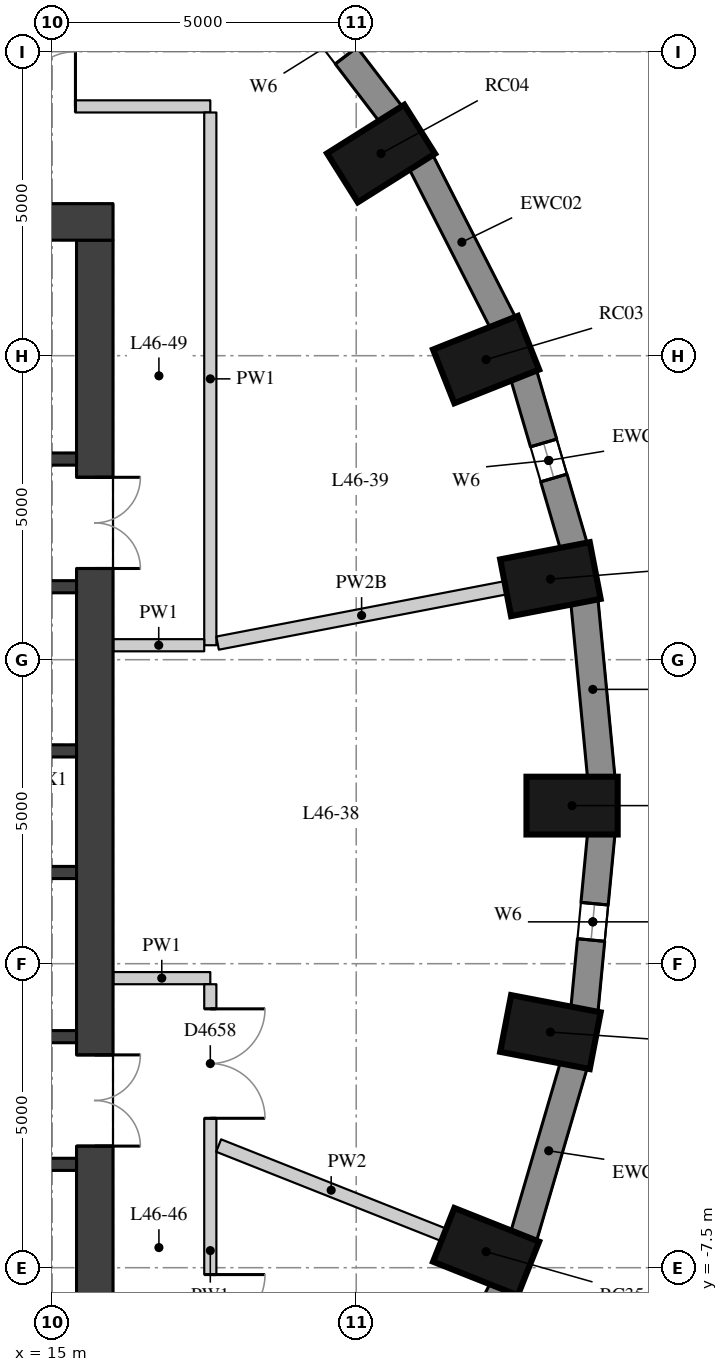
"""IFC4 building model, lengths in metres.
Left out: names, types, materials, properties, quantities, classifications, styles, units other than length and angle.
Written with IfcOpenShell. Run it as: python <this file> out.ifc"""

import sys

from ifc_helpers import new_model, si_unit, direction, frame, frame_2d, origin, origin_2d, place, context, subcontext, project, spatial, rectangle, extrude, element, fill, save


model = new_model("IFC4")
c1 = context("Model", 3, precision=1e-05, world=origin(), true_north=direction((0.0, 1.0)))
c2 = subcontext(c1, "Body", "Model", "MODEL_VIEW")
j1 = project(units=[si_unit("LENGTHUNIT", "METRE"), si_unit("PLANEANGLEUNIT", "RADIAN")], contexts=[c1])
p1 = place(None, origin())
s1 = spatial("IfcSite", under=j1, at=p1, CompositionType="ELEMENT")
p2 = place(p1, origin())
s2 = spatial("IfcBuilding", under=s1, at=p2, CompositionType="ELEMENT")
p3 = place(p2, frame((0.0, 0.0, 164.9)))
s3 = spatial("IfcBuildingStorey", under=s2, at=p3, CompositionType="ELEMENT", Elevation=164.9)
for number, where, z_axis, x_axis in (
    (1, (23.55, 0.1, 0.0), (0.0, 0.0, 1.0), (1.0, 0.0, 0.0)),
    (2, (23.194, 3.825, 0.0), (0.0, 0.0, 1.0), (0.982, 0.189, 0.0)),
    (3, (22.136, 7.436, 0.0), (0.0, 0.0, 1.0), (0.93, 0.369, 0.0)),
    (4, (20.408, 10.825, 0.0), (0.0, 0.0, 1.0), (0.846, 0.533, 0.0)),
    (5, (22.136, -7.236, 0.0), (0.0, 0.0, 1.0), (0.93, -0.369, 0.0)),
    (6, (23.194, -3.625, 0.0), (0.0, 0.0, 1.0), (0.982, -0.189, 0.0)),
):
    element("IfcColumn", number, at=place(p3, frame(where, z_axis=z_axis, x_axis=x_axis)), inside=s3, PredefinedType="COLUMN", context=c2, shape_type="SweptSolid", body=[
        extrude(rectangle(XDim=1.5, YDim=0.95, at=origin_2d()), origin(), (0.0, 0.0, 1.0), 3.3),
    ])
p4 = place(p3, frame((24.031, 0.555, 0.0), z_axis=(0.0, 0.0, 1.0), x_axis=(-0.095265737322, 0.995451876935, 0.0)))
e7 = element("IfcWall", 7, at=p4, inside=s3, PredefinedType="SOLIDWALL", context=c2, shape_type="SweptSolid", body=[
    extrude(rectangle(XDim=2.927, YDim=0.45, at=frame_2d((1.463, 0.0))), origin(), (0.0, 0.0, 1.0), 3.02),
])
p5 = place(p3, frame((23.58, 4.362, 0.0), z_axis=(0.0, 0.0, 1.0), x_axis=(-0.281049481624, 0.959693278542, 0.0)))
e8 = element("IfcWall", 8, at=p5, inside=s3, PredefinedType="SOLIDWALL", context=c2, shape_type="SweptSolid", body=[
    extrude(rectangle(XDim=2.948, YDim=0.45, at=frame_2d((1.474, 0.0))), origin(), (0.0, 0.0, 1.0), 3.02),
])
p6 = place(p5, frame((1.174, 0.0, 0.4)))
e9 = element("IfcOpeningElement", 9, at=p6, cuts=e8, PredefinedType="OPENING", context=c2, shape_type="SweptSolid", body=[
    extrude(rectangle(XDim=0.6, YDim=1.75, at=frame_2d((0.3, 0.875))), frame((0.0, 0.235, 0.0), z_axis=(0.0, -1.0, 0.0), x_axis=(1.0, 0.0, 0.0)), (0.0, 0.0, 1.0), 0.47),
])
p7 = place(p3, frame((22.415, 8.037, 0.0), z_axis=(0.0, 0.0, 1.0), x_axis=(-0.454133999889, 0.890933392653, 0.0)))
e10 = element("IfcWall", 10, at=p7, inside=s3, PredefinedType="SOLIDWALL", context=c2, shape_type="SweptSolid", body=[
    extrude(rectangle(XDim=2.986, YDim=0.45, at=frame_2d((1.493, 0.0))), origin(), (0.0, 0.0, 1.0), 3.02),
])
p8 = place(p3, frame((20.574, 11.467, 0.0), z_axis=(0.0, 0.0, 1.0), x_axis=(-0.607817056371, 0.794077090706, 0.0)))
e11 = element("IfcWall", 11, at=p8, inside=s3, PredefinedType="SOLIDWALL", context=c2, shape_type="SweptSolid", body=[
    extrude(rectangle(XDim=3.037, YDim=0.45, at=frame_2d((1.519, 0.0))), origin(), (0.0, 0.0, 1.0), 3.02),
])
p9 = place(p8, frame((1.219, 0.0, 0.4)))
e12 = element("IfcOpeningElement", 12, at=p9, cuts=e11, PredefinedType="OPENING", context=c2, shape_type="SweptSolid", body=[
    extrude(rectangle(XDim=0.6, YDim=1.75, at=frame_2d((0.3, 0.875))), frame((0.0, 0.235, 0.0), z_axis=(0.0, -1.0, 0.0), x_axis=(1.0, 0.0, 0.0)), (0.0, 0.0, 1.0), 0.47),
])
p10 = place(p3, frame((21.059, -10.497, 0.0), z_axis=(0.0, 0.0, 1.0), x_axis=(0.454133999889, 0.890933392653, 0.0)))
e13 = element("IfcWall", 13, at=p10, inside=s3, PredefinedType="SOLIDWALL", context=c2, shape_type="SweptSolid", body=[
    extrude(rectangle(XDim=2.986, YDim=0.45, at=frame_2d((1.493, 0.0))), origin(), (0.0, 0.0, 1.0), 3.02),
])
p11 = place(p10, frame((1.193, 0.0, 0.4)))
e14 = element("IfcOpeningElement", 14, at=p11, cuts=e13, PredefinedType="OPENING", context=c2, shape_type="SweptSolid", body=[
    extrude(rectangle(XDim=0.6, YDim=1.75, at=frame_2d((0.3, 0.875))), frame((0.0, 0.235, 0.0), z_axis=(0.0, -1.0, 0.0), x_axis=(1.0, 0.0, 0.0)), (0.0, 0.0, 1.0), 0.47),
])
p12 = place(p3, frame((22.751, -6.991, 0.0), z_axis=(0.0, 0.0, 1.0), x_axis=(0.281049481624, 0.959693278542, 0.0)))
e15 = element("IfcWall", 15, at=p12, inside=s3, PredefinedType="SOLIDWALL", context=c2, shape_type="SweptSolid", body=[
    extrude(rectangle(XDim=2.948, YDim=0.45, at=frame_2d((1.474, 0.0))), origin(), (0.0, 0.0, 1.0), 3.02),
])
p13 = place(p3, frame((23.752, -3.269, 0.0), z_axis=(0.0, 0.0, 1.0), x_axis=(0.095257827044, 0.995452633924, 0.0)))
e16 = element("IfcWall", 16, at=p13, inside=s3, PredefinedType="SOLIDWALL", context=c2, shape_type="SweptSolid", body=[
    extrude(rectangle(XDim=2.927, YDim=0.45, at=frame_2d((1.463, 0.0))), origin(), (0.0, 0.0, 1.0), 3.02),
])
p14 = place(p13, frame((1.163, 0.0, 0.4)))
e17 = element("IfcOpeningElement", 17, at=p14, cuts=e16, PredefinedType="OPENING", context=c2, shape_type="SweptSolid", body=[
    extrude(rectangle(XDim=0.6, YDim=1.75, at=frame_2d((0.3, 0.875))), frame((0.0, 0.235, 0.0), z_axis=(0.0, -1.0, 0.0), x_axis=(1.0, 0.0, 0.0)), (0.0, 0.0, 1.0), 0.47),
])
p15 = place(p3, frame((15.7, -9.4, 0.0), z_axis=(0.0, 0.0, 1.0), x_axis=(0.0, 1.0, 0.0)))
e18 = element("IfcWall", 18, at=p15, inside=s3, PredefinedType="SHEAR", context=c2, shape_type="SweptSolid", body=[
    extrude(rectangle(XDim=18.8, YDim=0.6, at=frame_2d((9.4, 0.0))), origin(), (0.0, 0.0, 1.0), 3.02),
])
p16 = place(p15, frame((13.4, 0.0, 0.0)))
e19 = element("IfcOpeningElement", 19, at=p16, cuts=e18, PredefinedType="OPENING", context=c2, shape_type="SweptSolid", body=[
    extrude(rectangle(XDim=1.5, YDim=2.1, at=frame_2d((0.75, 1.05))), frame((0.0, 0.31, 0.0), z_axis=(0.0, -1.0, 0.0), x_axis=(1.0, 0.0, 0.0)), (0.0, 0.0, 1.0), 0.62),
])
p17 = place(p15, frame((3.9, 0.0, 0.0)))
e20 = element("IfcOpeningElement", 20, at=p17, cuts=e18, PredefinedType="OPENING", context=c2, shape_type="SweptSolid", body=[
    extrude(rectangle(XDim=1.5, YDim=2.1, at=frame_2d((0.75, 1.05))), frame((0.0, 0.31, 0.0), z_axis=(0.0, -1.0, 0.0), x_axis=(1.0, 0.0, 0.0)), (0.0, 0.0, 1.0), 0.62),
])
p18 = place(p3, frame((4.0, 9.7, 0.0), z_axis=(0.0, 0.0, 1.0), x_axis=(1.0, 0.0, 0.0)))
e21 = element("IfcWall", 21, at=p18, inside=s3, PredefinedType="SHEAR", context=c2, shape_type="SweptSolid", body=[
    extrude(rectangle(XDim=12.0, YDim=0.6, at=frame_2d((6.0, 0.0))), origin(), (0.0, 0.0, 1.0), 3.02),
])
p19 = place(p3, frame((4.6, 5.8, 0.0), z_axis=(0.0, 0.0, 1.0), x_axis=(1.0, 0.0, 0.0)))
e22 = element("IfcWall", 22, at=p19, inside=s3, PredefinedType="SHEAR", context=c2, shape_type="SweptSolid", body=[
    extrude(rectangle(XDim=10.8, YDim=0.2, at=frame_2d((5.4, 0.0))), origin(), (0.0, 0.0, 1.0), 3.02),
])
p20 = place(p19, frame((7.05, 0.0, 0.0)))
e23 = element("IfcOpeningElement", 23, at=p20, cuts=e22, PredefinedType="OPENING", context=c2, shape_type="SweptSolid", body=[
    extrude(rectangle(XDim=1.1, YDim=2.1, at=frame_2d((0.55, 1.05))), frame((0.0, 0.11, 0.0), z_axis=(0.0, -1.0, 0.0), x_axis=(1.0, 0.0, 0.0)), (0.0, 0.0, 1.0), 0.22),
])
p21 = place(p19, frame((9.05, 0.0, 0.0)))
e24 = element("IfcOpeningElement", 24, at=p21, cuts=e22, PredefinedType="OPENING", context=c2, shape_type="SweptSolid", body=[
    extrude(rectangle(XDim=1.1, YDim=2.1, at=frame_2d((0.55, 1.05))), frame((0.0, 0.11, 0.0), z_axis=(0.0, -1.0, 0.0), x_axis=(1.0, 0.0, 0.0)), (0.0, 0.0, 1.0), 0.22),
])
p22 = place(p3, frame((4.6, 3.7, 0.0), z_axis=(0.0, 0.0, 1.0), x_axis=(1.0, 0.0, 0.0)))
e25 = element("IfcWall", 25, at=p22, inside=s3, PredefinedType="SHEAR", context=c2, shape_type="SweptSolid", body=[
    extrude(rectangle(XDim=10.8, YDim=0.2, at=frame_2d((5.4, 0.0))), origin(), (0.0, 0.0, 1.0), 3.02),
])
p23 = place(p22, frame((6.6, 0.0, 0.0)))
e26 = element("IfcOpeningElement", 26, at=p23, cuts=e25, PredefinedType="OPENING", context=c2, shape_type="SweptSolid", body=[
    extrude(rectangle(XDim=1.1, YDim=2.1, at=frame_2d((0.55, 1.05))), frame((0.0, 0.11, 0.0), z_axis=(0.0, -1.0, 0.0), x_axis=(1.0, 0.0, 0.0)), (0.0, 0.0, 1.0), 0.22),
])
p24 = place(p22, frame((8.9, 0.0, 0.0)))
e27 = element("IfcOpeningElement", 27, at=p24, cuts=e25, PredefinedType="OPENING", context=c2, shape_type="SweptSolid", body=[
    extrude(rectangle(XDim=1.1, YDim=2.1, at=frame_2d((0.55, 1.05))), frame((0.0, 0.11, 0.0), z_axis=(0.0, -1.0, 0.0), x_axis=(1.0, 0.0, 0.0)), (0.0, 0.0, 1.0), 0.22),
])
for number, where, z_axis, x_axis in (
    (28, (4.6, 1.0, 0.0), (0.0, 0.0, 1.0), (1.0, 0.0, 0.0)),
    (29, (4.6, -1.0, 0.0), (0.0, 0.0, 1.0), (1.0, 0.0, 0.0)),
):
    element("IfcWall", number, at=place(p3, frame(where, z_axis=z_axis, x_axis=x_axis)), inside=s3, PredefinedType="SHEAR", context=c2, shape_type="SweptSolid", body=[
        extrude(rectangle(XDim=10.8, YDim=0.2, at=frame_2d((5.4, 0.0))), origin(), (0.0, 0.0, 1.0), 3.02),
    ])
p25 = place(p3, frame((4.6, -3.7, 0.0), z_axis=(0.0, 0.0, 1.0), x_axis=(1.0, 0.0, 0.0)))
e30 = element("IfcWall", 30, at=p25, inside=s3, PredefinedType="SHEAR", context=c2, shape_type="SweptSolid", body=[
    extrude(rectangle(XDim=10.8, YDim=0.2, at=frame_2d((5.4, 0.0))), origin(), (0.0, 0.0, 1.0), 3.02),
])
p26 = place(p25, frame((6.6, 0.0, 0.0)))
e31 = element("IfcOpeningElement", 31, at=p26, cuts=e30, PredefinedType="OPENING", context=c2, shape_type="SweptSolid", body=[
    extrude(rectangle(XDim=1.1, YDim=2.1, at=frame_2d((0.55, 1.05))), frame((0.0, 0.11, 0.0), z_axis=(0.0, -1.0, 0.0), x_axis=(1.0, 0.0, 0.0)), (0.0, 0.0, 1.0), 0.22),
])
p27 = place(p25, frame((8.9, 0.0, 0.0)))
e32 = element("IfcOpeningElement", 32, at=p27, cuts=e30, PredefinedType="OPENING", context=c2, shape_type="SweptSolid", body=[
    extrude(rectangle(XDim=1.1, YDim=2.1, at=frame_2d((0.55, 1.05))), frame((0.0, 0.11, 0.0), z_axis=(0.0, -1.0, 0.0), x_axis=(1.0, 0.0, 0.0)), (0.0, 0.0, 1.0), 0.22),
])
p28 = place(p3, frame((4.6, -5.8, 0.0), z_axis=(0.0, 0.0, 1.0), x_axis=(1.0, 0.0, 0.0)))
e33 = element("IfcWall", 33, at=p28, inside=s3, PredefinedType="SHEAR", context=c2, shape_type="SweptSolid", body=[
    extrude(rectangle(XDim=10.8, YDim=0.2, at=frame_2d((5.4, 0.0))), origin(), (0.0, 0.0, 1.0), 3.02),
])
p29 = place(p3, frame((8.817, 11.6, 0.0), z_axis=(0.0, 0.0, 1.0), x_axis=(1.0, 0.0, 0.0)))
e34 = element("IfcWall", 34, at=p29, inside=s3, PredefinedType="PARTITIONING", context=c2, shape_type="SweptSolid", body=[
    extrude(rectangle(XDim=8.783, YDim=0.2, at=frame_2d((4.392, 0.0))), origin(), (0.0, 0.0, 1.0), 3.02),
])
p30 = place(p29, frame((0.14, 0.0, 0.0)))
e35 = element("IfcOpeningElement", 35, at=p30, cuts=e34, PredefinedType="OPENING", context=c2, shape_type="SweptSolid", body=[
    extrude(rectangle(XDim=1.1, YDim=2.1, at=frame_2d((0.55, 1.05))), frame((0.0, 0.11, 0.0), z_axis=(0.0, -1.0, 0.0), x_axis=(1.0, 0.0, 0.0)), (0.0, 0.0, 1.0), 0.22),
])
p31 = place(p29, frame((4.766, 0.0, 0.0)))
e36 = element("IfcOpeningElement", 36, at=p31, cuts=e34, PredefinedType="OPENING", context=c2, shape_type="SweptSolid", body=[
    extrude(rectangle(XDim=1.8, YDim=2.1, at=frame_2d((0.9, 1.05))), frame((0.0, 0.11, 0.0), z_axis=(0.0, -1.0, 0.0), x_axis=(1.0, 0.0, 0.0)), (0.0, 0.0, 1.0), 0.22),
])
p32 = place(p3, frame((17.6, 11.5, 0.0), z_axis=(0.0, 0.0, 1.0), x_axis=(0.0, -1.0, 0.0)))
e37 = element("IfcWall", 37, at=p32, inside=s3, PredefinedType="PARTITIONING", context=c2, shape_type="SweptSolid", body=[
    extrude(rectangle(XDim=8.762, YDim=0.2, at=frame_2d((4.381, 0.0))), origin(), (0.0, 0.0, 1.0), 3.02),
])
p33 = place(p3, frame((17.5, 2.738, 0.0), z_axis=(0.0, 0.0, 1.0), x_axis=(-1.0, 0.0, 0.0)))
e38 = element("IfcWall", 38, at=p33, inside=s3, PredefinedType="PARTITIONING", context=c2, shape_type="SweptSolid", body=[
    extrude(rectangle(XDim=1.496, YDim=0.2, at=frame_2d((0.748, 0.0))), origin(), (0.0, 0.0, 1.0), 3.02),
])
p34 = place(p3, frame((16.004, -2.738, 0.0), z_axis=(0.0, 0.0, 1.0), x_axis=(1.0, 0.0, 0.0)))
e39 = element("IfcWall", 39, at=p34, inside=s3, PredefinedType="PARTITIONING", context=c2, shape_type="SweptSolid", body=[
    extrude(rectangle(XDim=1.596, YDim=0.2, at=frame_2d((0.798, 0.0))), origin(), (0.0, 0.0, 1.0), 3.02),
])
p35 = place(p3, frame((17.6, -2.838, 0.0), z_axis=(0.0, 0.0, 1.0), x_axis=(0.0, -1.0, 0.0)))
e40 = element("IfcWall", 40, at=p35, inside=s3, PredefinedType="PARTITIONING", context=c2, shape_type="SweptSolid", body=[
    extrude(rectangle(XDim=8.762, YDim=0.2, at=frame_2d((4.381, 0.0))), origin(), (0.0, 0.0, 1.0), 3.02),
])
p36 = place(p35, frame((4.775, 0.0, 0.0)))
e41 = element("IfcOpeningElement", 41, at=p36, cuts=e40, PredefinedType="OPENING", context=c2, shape_type="SweptSolid", body=[
    extrude(rectangle(XDim=1.8, YDim=2.1, at=frame_2d((0.9, 1.05))), frame((0.0, 0.11, 0.0), z_axis=(0.0, -1.0, 0.0), x_axis=(1.0, 0.0, 0.0)), (0.0, 0.0, 1.0), 0.22),
])
p37 = place(p35, frame((0.405, 0.0, 0.0)))
e42 = element("IfcOpeningElement", 42, at=p37, cuts=e40, PredefinedType="OPENING", context=c2, shape_type="SweptSolid", body=[
    extrude(rectangle(XDim=1.8, YDim=2.1, at=frame_2d((0.9, 1.05))), frame((0.0, 0.11, 0.0), z_axis=(0.0, -1.0, 0.0), x_axis=(1.0, 0.0, 0.0)), (0.0, 0.0, 1.0), 0.22),
])
p38 = place(p3, frame((22.457, 3.683, 0.0), z_axis=(0.0, 0.0, 1.0), x_axis=(-0.982022686577, -0.188762928159, 0.0)))
e43 = element("IfcWall", 43, at=p38, inside=s3, PredefinedType="PARTITIONING", context=c2, shape_type="SweptSolid", body=[
    extrude(rectangle(XDim=4.824, YDim=0.22, at=frame_2d((2.412, 0.0))), origin(), (0.0, 0.0, 1.0), 2.57),
])
p39 = place(p3, frame((21.439, -6.96, 0.0), z_axis=(0.0, 0.0, 1.0), x_axis=(-0.929517399972, 0.368778257426, 0.0)))
e44 = element("IfcWall", 44, at=p39, inside=s3, PredefinedType="PARTITIONING", context=c2, shape_type="SweptSolid", body=[
    extrude(rectangle(XDim=3.982, YDim=0.22, at=frame_2d((1.991, 0.0))), origin(), (0.0, 0.0, 1.0), 3.02),
])
p40 = place(p6, origin())
e45 = element("IfcWindow", 45, at=p40, inside=s3, PartitioningType="SINGLE_PANEL", PredefinedType="WINDOW", context=c2, shape_type="SweptSolid", body=[
    extrude(rectangle(XDim=0.6, YDim=1.75, at=frame_2d((0.3, 0.875))), frame((0.0, 0.035, 0.0), z_axis=(0.0, -1.0, 0.0), x_axis=(1.0, 0.0, 0.0)), (0.0, 0.0, 1.0), 0.06),
])
fill(e9, e45)
p41 = place(p9, origin())
e46 = element("IfcWindow", 46, at=p41, inside=s3, PartitioningType="SINGLE_PANEL", PredefinedType="WINDOW", context=c2, shape_type="SweptSolid", body=[
    extrude(rectangle(XDim=0.6, YDim=1.75, at=frame_2d((0.3, 0.875))), frame((0.0, 0.035, 0.0), z_axis=(0.0, -1.0, 0.0), x_axis=(1.0, 0.0, 0.0)), (0.0, 0.0, 1.0), 0.06),
])
fill(e12, e46)
p42 = place(p14, origin())
e47 = element("IfcWindow", 47, at=p42, inside=s3, PartitioningType="SINGLE_PANEL", PredefinedType="WINDOW", context=c2, shape_type="SweptSolid", body=[
    extrude(rectangle(XDim=0.6, YDim=1.75, at=frame_2d((0.3, 0.875))), frame((0.0, 0.035, 0.0), z_axis=(0.0, -1.0, 0.0), x_axis=(1.0, 0.0, 0.0)), (0.0, 0.0, 1.0), 0.06),
])
fill(e17, e47)
p43 = place(p16, origin())
e48 = element("IfcDoor", 48, at=p43, inside=s3, OperationType="DOUBLE_DOOR_SINGLE_SWING", PredefinedType="DOOR", context=c2, shape_type="SweptSolid", body=[
    extrude(rectangle(XDim=1.5, YDim=2.1, at=frame_2d((0.75, 1.05))), frame((0.0, 0.025, 0.0), z_axis=(0.0, -1.0, 0.0), x_axis=(1.0, 0.0, 0.0)), (0.0, 0.0, 1.0), 0.05),
])
fill(e19, e48)
p44 = place(p17, origin())
e49 = element("IfcDoor", 49, at=p44, inside=s3, OperationType="DOUBLE_DOOR_SINGLE_SWING", PredefinedType="DOOR", context=c2, shape_type="SweptSolid", body=[
    extrude(rectangle(XDim=1.5, YDim=2.1, at=frame_2d((0.75, 1.05))), frame((0.0, 0.025, 0.0), z_axis=(0.0, -1.0, 0.0), x_axis=(1.0, 0.0, 0.0)), (0.0, 0.0, 1.0), 0.05),
])
fill(e20, e49)
p45 = place(p36, origin())
e50 = element("IfcDoor", 50, at=p45, inside=s3, OperationType="DOUBLE_DOOR_SINGLE_SWING", PredefinedType="DOOR", context=c2, shape_type="SweptSolid", body=[
    extrude(rectangle(XDim=1.8, YDim=2.1, at=frame_2d((0.9, 1.05))), frame((0.0, 0.025, 0.0), z_axis=(0.0, -1.0, 0.0), x_axis=(1.0, 0.0, 0.0)), (0.0, 0.0, 1.0), 0.05),
])
fill(e41, e50)
p46 = place(p37, origin())
e51 = element("IfcDoor", 51, at=p46, inside=s3, OperationType="DOUBLE_DOOR_SINGLE_SWING", PredefinedType="DOOR", context=c2, shape_type="SweptSolid", body=[
    extrude(rectangle(XDim=1.8, YDim=2.1, at=frame_2d((0.9, 1.05))), frame((0.0, 0.025, 0.0), z_axis=(0.0, -1.0, 0.0), x_axis=(1.0, 0.0, 0.0)), (0.0, 0.0, 1.0), 0.05),
])
fill(e42, e51)
p47 = place(p31, origin())
e52 = element("IfcDoor", 52, at=p47, inside=s3, OperationType="DOUBLE_DOOR_SINGLE_SWING", PredefinedType="DOOR", context=c2, shape_type="SweptSolid", body=[
    extrude(rectangle(XDim=1.8, YDim=2.1, at=frame_2d((0.9, 1.05))), frame((0.0, 0.025, 0.0), z_axis=(0.0, -1.0, 0.0), x_axis=(1.0, 0.0, 0.0)), (0.0, 0.0, 1.0), 0.05),
])
fill(e36, e52)
save(model, sys.argv[1])
